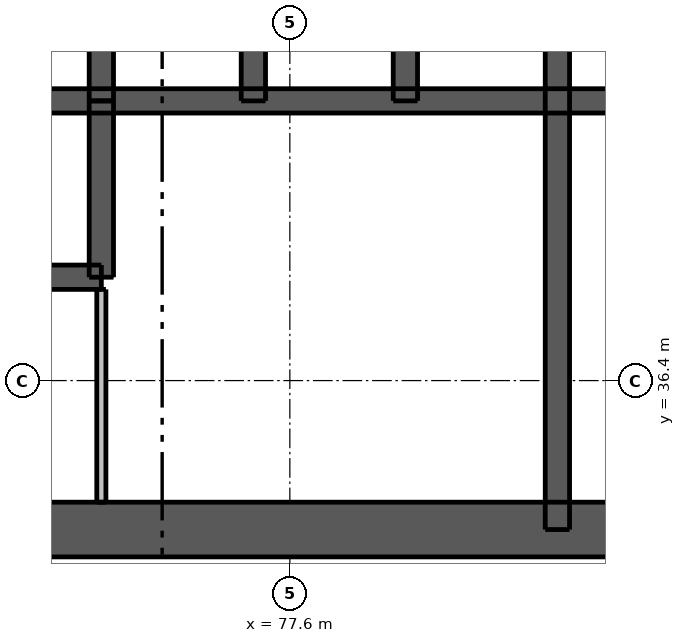
"""IFC4 building model, lengths in metres.
Left out: names, types, materials, properties, quantities, classifications, styles, units other than length and angle.
Written with IfcOpenShell. Run it as: python <this file> out.ifc"""

import sys

from ifc_helpers import new_model, si_unit, direction, frame, frame_2d, origin, place, context, subcontext, project, spatial, rectangle, extrude, element, fill, save


model = new_model("IFC4")
c1 = context("Model", 3, precision=1e-05, world=origin(), true_north=direction((0.0, 1.0)))
c2 = subcontext(c1, "Body", "Model", "MODEL_VIEW")
j1 = project(units=[si_unit("LENGTHUNIT", "METRE"), si_unit("PLANEANGLEUNIT", "RADIAN")], contexts=[c1])
p1 = place(None, origin())
s1 = spatial("IfcSite", under=j1, at=p1, CompositionType="ELEMENT")
p2 = place(p1, origin())
s2 = spatial("IfcBuilding", under=s1, at=p2, CompositionType="ELEMENT")
p3 = place(p2, frame((0.0, 0.0, 59.8)))
s3 = spatial("IfcBuildingStorey", under=s2, at=p3, CompositionType="ELEMENT", Elevation=59.8)
p4 = place(p3, frame((62.5, 33.95, 0.0), z_axis=(0.0, 0.0, 1.0), x_axis=(1.0, 0.0, 0.0)))
e1 = element("IfcWall", 1, at=p4, inside=s3, PredefinedType="SHEAR", context=c2, shape_type="SweptSolid", body=[
    extrude(rectangle(XDim=24.0, YDim=0.9, at=frame_2d((12.0, 0.0))), origin(), (0.0, 0.0, 1.0), 3.05),
])
p5 = place(p4, frame((2.05, 0.0, 0.0)))
e2 = element("IfcOpeningElement", 2, at=p5, cuts=e1, PredefinedType="OPENING", context=c2, shape_type="SweptSolid", body=[
    extrude(rectangle(XDim=1.1, YDim=2.1, at=frame_2d((0.55, 1.05))), frame((0.0, 0.46, 0.0), z_axis=(0.0, -1.0, 0.0), x_axis=(1.0, 0.0, 0.0)), (0.0, 0.0, 1.0), 0.92),
])
p6 = place(p4, frame((20.85, 0.0, 0.0)))
e3 = element("IfcOpeningElement", 3, at=p6, cuts=e1, PredefinedType="OPENING", context=c2, shape_type="SweptSolid", body=[
    extrude(rectangle(XDim=1.1, YDim=2.1, at=frame_2d((0.55, 1.05))), frame((0.0, 0.46, 0.0), z_axis=(0.0, -1.0, 0.0), x_axis=(1.0, 0.0, 0.0)), (0.0, 0.0, 1.0), 0.92),
])
p7 = place(p4, frame((8.0, 0.0, 0.0)))
e4 = element("IfcOpeningElement", 4, at=p7, cuts=e1, PredefinedType="OPENING", context=c2, shape_type="SweptSolid", body=[
    extrude(rectangle(XDim=1.1, YDim=2.1, at=frame_2d((0.55, 1.05))), frame((0.0, 0.46, 0.0), z_axis=(0.0, -1.0, 0.0), x_axis=(1.0, 0.0, 0.0)), (0.0, 0.0, 1.0), 0.92),
])
p8 = place(p4, frame((15.3, 0.0, 0.0)))
e5 = element("IfcOpeningElement", 5, at=p8, cuts=e1, PredefinedType="OPENING", context=c2, shape_type="SweptSolid", body=[
    extrude(rectangle(XDim=0.9, YDim=2.1, at=frame_2d((0.45, 1.05))), frame((0.0, 0.46, 0.0), z_axis=(0.0, -1.0, 0.0), x_axis=(1.0, 0.0, 0.0)), (0.0, 0.0, 1.0), 0.92),
])
p9 = place(p3, frame((62.95, 41.0, 0.0), z_axis=(0.0, 0.0, 1.0), x_axis=(1.0, 0.0, 0.0)))
e6 = element("IfcWall", 6, at=p9, inside=s3, PredefinedType="SHEAR", context=c2, shape_type="SweptSolid", body=[
    extrude(rectangle(XDim=23.1, YDim=0.4, at=frame_2d((11.55, 0.0))), origin(), (0.0, 0.0, 1.0), 3.05),
])
p10 = place(p3, frame((82.0, 33.95, 0.0), z_axis=(0.0, 0.0, 1.0), x_axis=(0.0, 1.0, 0.0)))
e7 = element("IfcWall", 7, at=p10, inside=s3, PredefinedType="SHEAR", context=c2, shape_type="SweptSolid", body=[
    extrude(rectangle(XDim=9.95, YDim=0.4, at=frame_2d((4.975, 0.0))), origin(), (0.0, 0.0, 1.0), 3.05),
])
for number, where, z_axis, x_axis in (
    (8, (74.5, 41.0, 0.0), (0.0, 0.0, 1.0), (0.0, 1.0, 0.0)),
    (9, (77.0, 41.0, 0.0), (0.0, 0.0, 1.0), (0.0, 1.0, 0.0)),
    (10, (79.5, 41.0, 0.0), (0.0, 0.0, 1.0), (0.0, 1.0, 0.0)),
):
    element("IfcWall", number, at=place(p3, frame(where, z_axis=z_axis, x_axis=x_axis)), inside=s3, PredefinedType="SHEAR", context=c2, shape_type="SweptSolid", body=[
        extrude(rectangle(XDim=2.9, YDim=0.4, at=frame_2d((1.45, 0.0))), origin(), (0.0, 0.0, 1.0), 3.05),
    ])
p11 = place(p3, frame((67.0, 38.1, 0.0), z_axis=(0.0, 0.0, 1.0), x_axis=(1.0, 0.0, 0.0)))
e11 = element("IfcWall", 11, at=p11, inside=s3, PredefinedType="SHEAR", context=c2, shape_type="SweptSolid", body=[
    extrude(rectangle(XDim=7.5, YDim=0.4, at=frame_2d((3.75, 0.0))), origin(), (0.0, 0.0, 1.0), 3.05),
])
p12 = place(p11, frame((0.7, 0.0, 0.0)))
e12 = element("IfcOpeningElement", 12, at=p12, cuts=e11, PredefinedType="OPENING", context=c2, shape_type="SweptSolid", body=[
    extrude(rectangle(XDim=1.1, YDim=2.1, at=frame_2d((0.55, 1.05))), frame((0.0, 0.21, 0.0), z_axis=(0.0, -1.0, 0.0), x_axis=(1.0, 0.0, 0.0)), (0.0, 0.0, 1.0), 0.42),
])
p13 = place(p11, frame((3.2, 0.0, 0.0)))
e13 = element("IfcOpeningElement", 13, at=p13, cuts=e11, PredefinedType="OPENING", context=c2, shape_type="SweptSolid", body=[
    extrude(rectangle(XDim=1.1, YDim=2.1, at=frame_2d((0.55, 1.05))), frame((0.0, 0.21, 0.0), z_axis=(0.0, -1.0, 0.0), x_axis=(1.0, 0.0, 0.0)), (0.0, 0.0, 1.0), 0.42),
])
p14 = place(p11, frame((5.65, 0.0, 0.0)))
e14 = element("IfcOpeningElement", 14, at=p14, cuts=e11, PredefinedType="OPENING", context=c2, shape_type="SweptSolid", body=[
    extrude(rectangle(XDim=1.2, YDim=2.1, at=frame_2d((0.6, 1.05))), frame((0.0, 0.21, 0.0), z_axis=(0.0, -1.0, 0.0), x_axis=(1.0, 0.0, 0.0)), (0.0, 0.0, 1.0), 0.42),
])
p15 = place(p3, frame((74.5, 38.1, 0.0), z_axis=(0.0, 0.0, 1.0), x_axis=(0.0, 1.0, 0.0)))
e15 = element("IfcWall", 15, at=p15, inside=s3, PredefinedType="SHEAR", context=c2, shape_type="SweptSolid", body=[
    extrude(rectangle(XDim=2.9, YDim=0.4, at=frame_2d((1.45, 0.0))), origin(), (0.0, 0.0, 1.0), 3.05),
])
p16 = place(p3, frame((74.5, 34.4, 0.0), z_axis=(0.0, 0.0, 1.0), x_axis=(0.0, 1.0, 0.0)))
e16 = element("IfcWall", 16, at=p16, inside=s3, PredefinedType="PLUMBINGWALL", context=c2, shape_type="SweptSolid", body=[
    extrude(rectangle(XDim=3.5, YDim=0.15, at=frame_2d((1.75, 0.0))), origin(), (0.0, 0.0, 1.0), 3.05),
])
p17 = place(p8, origin())
e17 = element("IfcDoor", 17, at=p17, inside=s3, OperationType="SINGLE_SWING_LEFT", PredefinedType="DOOR", context=c2, shape_type="SweptSolid", body=[
    extrude(rectangle(XDim=0.9, YDim=2.1, at=frame_2d((0.45, 1.05))), frame((0.0, 0.438, 0.0), z_axis=(0.0, -1.0, 0.0), x_axis=(1.0, 0.0, 0.0)), (0.0, 0.0, 1.0), 0.05),
])
fill(e5, e17)
p18 = place(p14, origin())
e18 = element("IfcDoor", 18, at=p18, inside=s3, OperationType="DOUBLE_DOOR_SLIDING", PredefinedType="DOOR", context=c2, shape_type="SweptSolid", body=[
    extrude(rectangle(XDim=1.2, YDim=2.1, at=frame_2d((0.6, 1.05))), frame((0.0, 0.025, 0.0), z_axis=(0.0, -1.0, 0.0), x_axis=(1.0, 0.0, 0.0)), (0.0, 0.0, 1.0), 0.05),
])
fill(e14, e18)
save(model, sys.argv[1])
